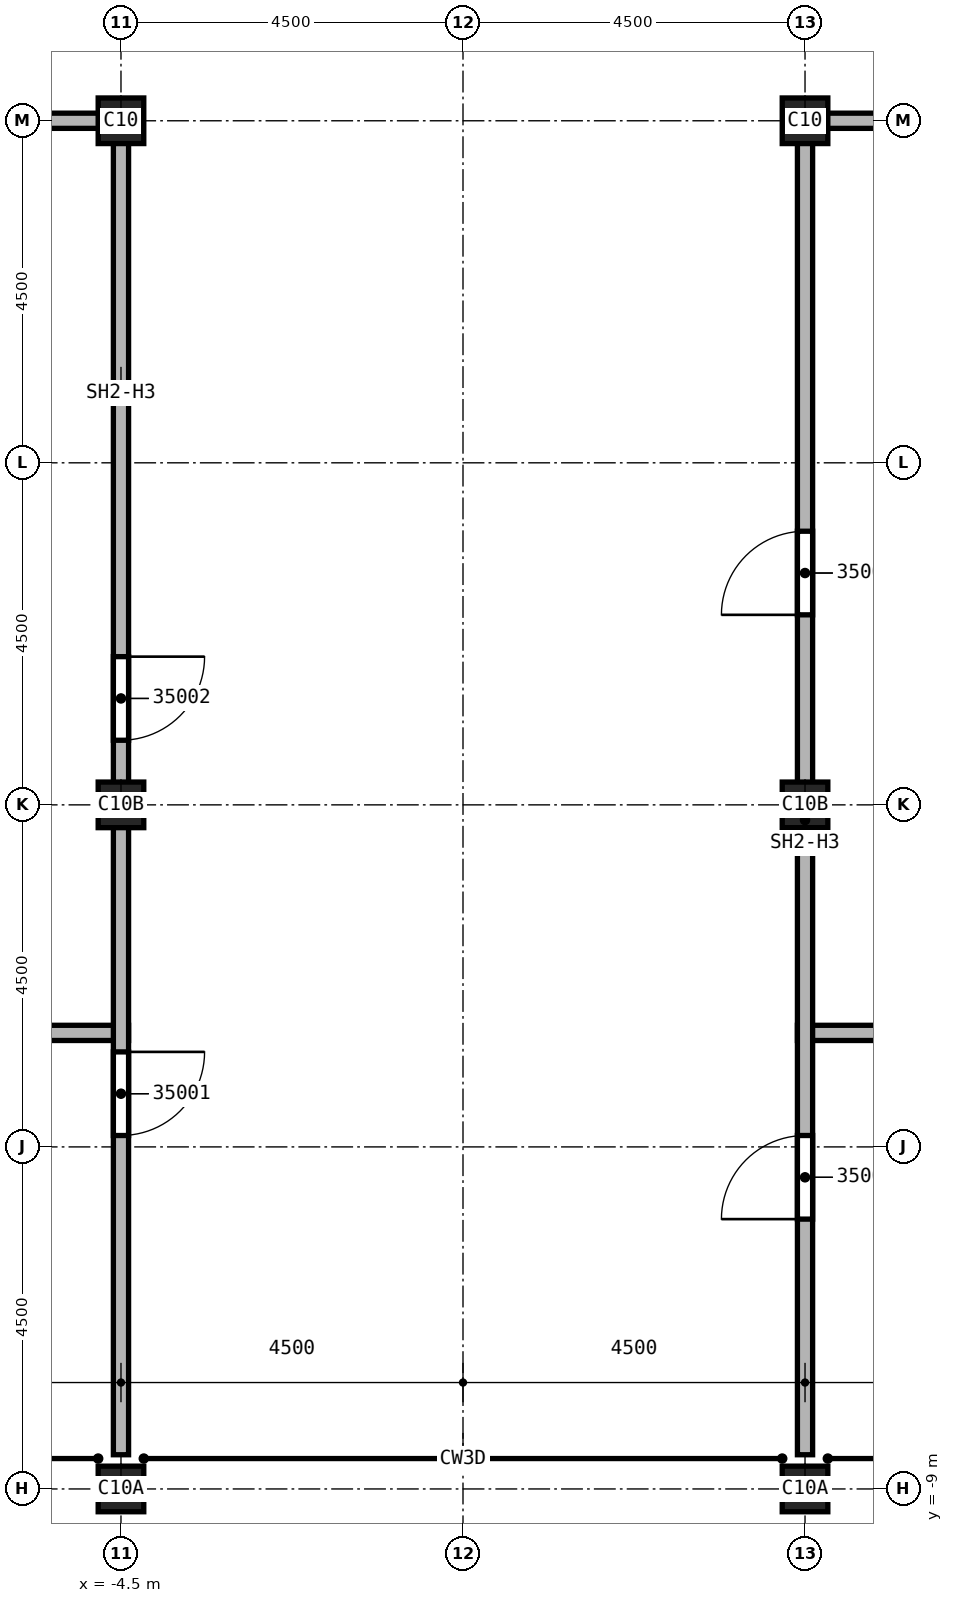
"""IFC4 building model, lengths in metres.
Left out: names, types, materials, properties, quantities, classifications, styles, units other than length and angle.
Written with IfcOpenShell. Run it as: python <this file> out.ifc"""

import sys

from ifc_helpers import new_model, si_unit, direction, frame, frame_2d, origin, origin_2d, place, context, subcontext, project, spatial, rectangle, extrude, element, fill, save


model = new_model("IFC4")
c1 = context("Model", 3, precision=1e-05, world=origin(), true_north=direction((0.0, 1.0)))
c2 = subcontext(c1, "Body", "Model", "MODEL_VIEW")
j1 = project(units=[si_unit("LENGTHUNIT", "METRE"), si_unit("PLANEANGLEUNIT", "RADIAN")], contexts=[c1])
p1 = place(None, origin())
s1 = spatial("IfcSite", under=j1, at=p1, CompositionType="ELEMENT")
p2 = place(p1, origin())
s2 = spatial("IfcBuilding", under=s1, at=p2, CompositionType="ELEMENT")
p3 = place(p2, frame((0.0, 0.0, 376.0)))
s3 = spatial("IfcBuildingStorey", under=s2, at=p3, CompositionType="ELEMENT", Elevation=376.0)
p4 = place(p3, frame((4.5, 0.0, 0.0), z_axis=(0.0, 0.0, 1.0), x_axis=(1.0, 0.0, 0.0)))
e1 = element("IfcColumn", 1, at=p4, inside=s3, PredefinedType="COLUMN", context=c2, shape_type="SweptSolid", body=[
    extrude(rectangle(XDim=0.6, YDim=0.6, at=origin_2d()), origin(), (0.0, 0.0, 1.0), 7.919),
])
p5 = place(p3, frame((4.5, 9.0, 0.0), z_axis=(0.0, 0.0, 1.0), x_axis=(1.0, 0.0, 0.0)))
e2 = element("IfcColumn", 2, at=p5, inside=s3, PredefinedType="COLUMN", context=c2, shape_type="SweptSolid", body=[
    extrude(rectangle(XDim=0.6, YDim=0.6, at=origin_2d()), origin(), (0.0, 0.0, 1.0), 4.6),
])
p6 = place(p3, frame((4.5, -9.0, 0.0), z_axis=(0.0, 0.0, 1.0), x_axis=(1.0, 0.0, 0.0)))
e3 = element("IfcColumn", 3, at=p6, inside=s3, PredefinedType="COLUMN", context=c2, shape_type="SweptSolid", body=[
    extrude(rectangle(XDim=0.6, YDim=0.6, at=origin_2d()), origin(), (0.0, 0.0, 1.0), 3.725),
])
p7 = place(p3, frame((-4.5, 0.0, 0.0), z_axis=(0.0, 0.0, 1.0), x_axis=(1.0, 0.0, 0.0)))
e4 = element("IfcColumn", 4, at=p7, inside=s3, PredefinedType="COLUMN", context=c2, shape_type="SweptSolid", body=[
    extrude(rectangle(XDim=0.6, YDim=0.6, at=origin_2d()), origin(), (0.0, 0.0, 1.0), 7.919),
])
p8 = place(p3, frame((-4.5, 9.0, 0.0), z_axis=(0.0, 0.0, 1.0), x_axis=(1.0, 0.0, 0.0)))
e5 = element("IfcColumn", 5, at=p8, inside=s3, PredefinedType="COLUMN", context=c2, shape_type="SweptSolid", body=[
    extrude(rectangle(XDim=0.6, YDim=0.6, at=origin_2d()), origin(), (0.0, 0.0, 1.0), 4.6),
])
p9 = place(p3, frame((-4.5, -9.0, 0.0), z_axis=(0.0, 0.0, 1.0), x_axis=(1.0, 0.0, 0.0)))
e6 = element("IfcColumn", 6, at=p9, inside=s3, PredefinedType="COLUMN", context=c2, shape_type="SweptSolid", body=[
    extrude(rectangle(XDim=0.6, YDim=0.6, at=origin_2d()), origin(), (0.0, 0.0, 1.0), 3.725),
])
p10 = place(p3, frame((-7.625, -3.0, 0.0), z_axis=(0.0, 0.0, 1.0), x_axis=(1.0, 0.0, 0.0)))
e7 = element("IfcWall", 7, at=p10, inside=s3, PredefinedType="SOLIDWALL", context=c2, shape_type="SweptSolid", body=[
    extrude(rectangle(XDim=3.225, YDim=0.2, at=frame_2d((1.613, 0.0))), origin(), (0.0, 0.0, 1.0), 4.15),
])
p11 = place(p3, frame((-7.5, 9.0, 0.0), z_axis=(0.0, 0.0, 1.0), x_axis=(1.0, 0.0, 0.0)))
e8 = element("IfcWall", 8, at=p11, inside=s3, PredefinedType="SOLIDWALL", context=c2, shape_type="SweptSolid", body=[
    extrude(rectangle(XDim=3.0, YDim=0.2, at=frame_2d((1.5, 0.0))), origin(), (0.0, 0.0, 1.0), 3.754),
])
p12 = place(p3, frame((-4.5, 9.1, 0.0), z_axis=(0.0, 0.0, 1.0), x_axis=(0.0, -1.0, 0.0)))
e9 = element("IfcWall", 9, at=p12, inside=s3, PredefinedType="SOLIDWALL", context=c2, shape_type="SweptSolid", body=[
    extrude(rectangle(XDim=17.65, YDim=0.2, at=frame_2d((8.825, 0.0))), origin(), (0.0, 0.0, 1.0), 3.722),
])
p13 = place(p12, frame((12.35, 0.0, 0.0)))
e10 = element("IfcOpeningElement", 10, at=p13, cuts=e9, PredefinedType="OPENING", context=c2, shape_type="SweptSolid", body=[
    extrude(rectangle(XDim=1.1, YDim=2.1, at=frame_2d((0.55, 1.05))), frame((0.0, 0.1, 0.0), z_axis=(0.0, -1.0, 0.0), x_axis=(1.0, 0.0, 0.0)), (0.0, 0.0, 1.0), 0.2),
])
p14 = place(p12, frame((7.15, 0.0, 0.0)))
e11 = element("IfcOpeningElement", 11, at=p14, cuts=e9, PredefinedType="OPENING", context=c2, shape_type="SweptSolid", body=[
    extrude(rectangle(XDim=1.1, YDim=2.1, at=frame_2d((0.55, 1.05))), frame((0.0, 0.1, 0.0), z_axis=(0.0, -1.0, 0.0), x_axis=(1.0, 0.0, 0.0)), (0.0, 0.0, 1.0), 0.2),
])
p15 = place(p3, frame((4.4, -3.0, 0.0), z_axis=(0.0, 0.0, 1.0), x_axis=(1.0, 0.0, 0.0)))
e12 = element("IfcWall", 12, at=p15, inside=s3, PredefinedType="SOLIDWALL", context=c2, shape_type="SweptSolid", body=[
    extrude(rectangle(XDim=3.225, YDim=0.2, at=frame_2d((1.613, 0.0))), origin(), (0.0, 0.0, 1.0), 4.15),
])
p16 = place(p3, frame((4.5, -8.55, 0.0), z_axis=(0.0, 0.0, 1.0), x_axis=(0.0, 1.0, 0.0)))
e13 = element("IfcWall", 13, at=p16, inside=s3, PredefinedType="SOLIDWALL", context=c2, shape_type="SweptSolid", body=[
    extrude(rectangle(XDim=17.65, YDim=0.2, at=frame_2d((8.825, 0.0))), origin(), (0.0, 0.0, 1.0), 3.722),
])
p17 = place(p16, frame((3.1, 0.0, 0.0)))
e14 = element("IfcOpeningElement", 14, at=p17, cuts=e13, PredefinedType="OPENING", context=c2, shape_type="SweptSolid", body=[
    extrude(rectangle(XDim=1.1, YDim=2.1, at=frame_2d((0.55, 1.05))), frame((0.0, 0.1, 0.0), z_axis=(0.0, -1.0, 0.0), x_axis=(1.0, 0.0, 0.0)), (0.0, 0.0, 1.0), 0.2),
])
p18 = place(p16, frame((11.05, 0.0, 0.0)))
e15 = element("IfcOpeningElement", 15, at=p18, cuts=e13, PredefinedType="OPENING", context=c2, shape_type="SweptSolid", body=[
    extrude(rectangle(XDim=1.1, YDim=2.1, at=frame_2d((0.55, 1.05))), frame((0.0, 0.1, 0.0), z_axis=(0.0, -1.0, 0.0), x_axis=(1.0, 0.0, 0.0)), (0.0, 0.0, 1.0), 0.2),
])
p19 = place(p3, frame((4.5, 9.0, 0.0), z_axis=(0.0, 0.0, 1.0), x_axis=(1.0, 0.0, 0.0)))
e16 = element("IfcWall", 16, at=p19, inside=s3, PredefinedType="SOLIDWALL", context=c2, shape_type="SweptSolid", body=[
    extrude(rectangle(XDim=3.0, YDim=0.2, at=frame_2d((1.5, 0.0))), origin(), (0.0, 0.0, 1.0), 3.754),
])
p20 = place(p13, origin())
e17 = element("IfcDoor", 17, at=p20, inside=s3, OperationType="SINGLE_SWING_RIGHT", PredefinedType="DOOR", context=c2, shape_type="SweptSolid", body=[
    extrude(rectangle(XDim=1.1, YDim=2.1, at=frame_2d((0.55, 1.05))), frame((0.0, 0.025, 0.0), z_axis=(0.0, -1.0, 0.0), x_axis=(1.0, 0.0, 0.0)), (0.0, 0.0, 1.0), 0.05),
])
fill(e10, e17)
p21 = place(p14, origin())
e18 = element("IfcDoor", 18, at=p21, inside=s3, OperationType="SINGLE_SWING_LEFT", PredefinedType="DOOR", context=c2, shape_type="SweptSolid", body=[
    extrude(rectangle(XDim=1.1, YDim=2.1, at=frame_2d((0.55, 1.05))), frame((0.0, 0.025, 0.0), z_axis=(0.0, -1.0, 0.0), x_axis=(1.0, 0.0, 0.0)), (0.0, 0.0, 1.0), 0.05),
])
fill(e11, e18)
p22 = place(p17, origin())
e19 = element("IfcDoor", 19, at=p22, inside=s3, OperationType="SINGLE_SWING_LEFT", PredefinedType="DOOR", context=c2, shape_type="SweptSolid", body=[
    extrude(rectangle(XDim=1.1, YDim=2.1, at=frame_2d((0.55, 1.05))), frame((0.0, 0.025, 0.0), z_axis=(0.0, -1.0, 0.0), x_axis=(1.0, 0.0, 0.0)), (0.0, 0.0, 1.0), 0.05),
])
fill(e14, e19)
p23 = place(p18, origin())
e20 = element("IfcDoor", 20, at=p23, inside=s3, OperationType="SINGLE_SWING_RIGHT", PredefinedType="DOOR", context=c2, shape_type="SweptSolid", body=[
    extrude(rectangle(XDim=1.1, YDim=2.1, at=frame_2d((0.55, 1.05))), frame((0.0, 0.025, 0.0), z_axis=(0.0, -1.0, 0.0), x_axis=(1.0, 0.0, 0.0)), (0.0, 0.0, 1.0), 0.05),
])
fill(e15, e20)
save(model, sys.argv[1])
